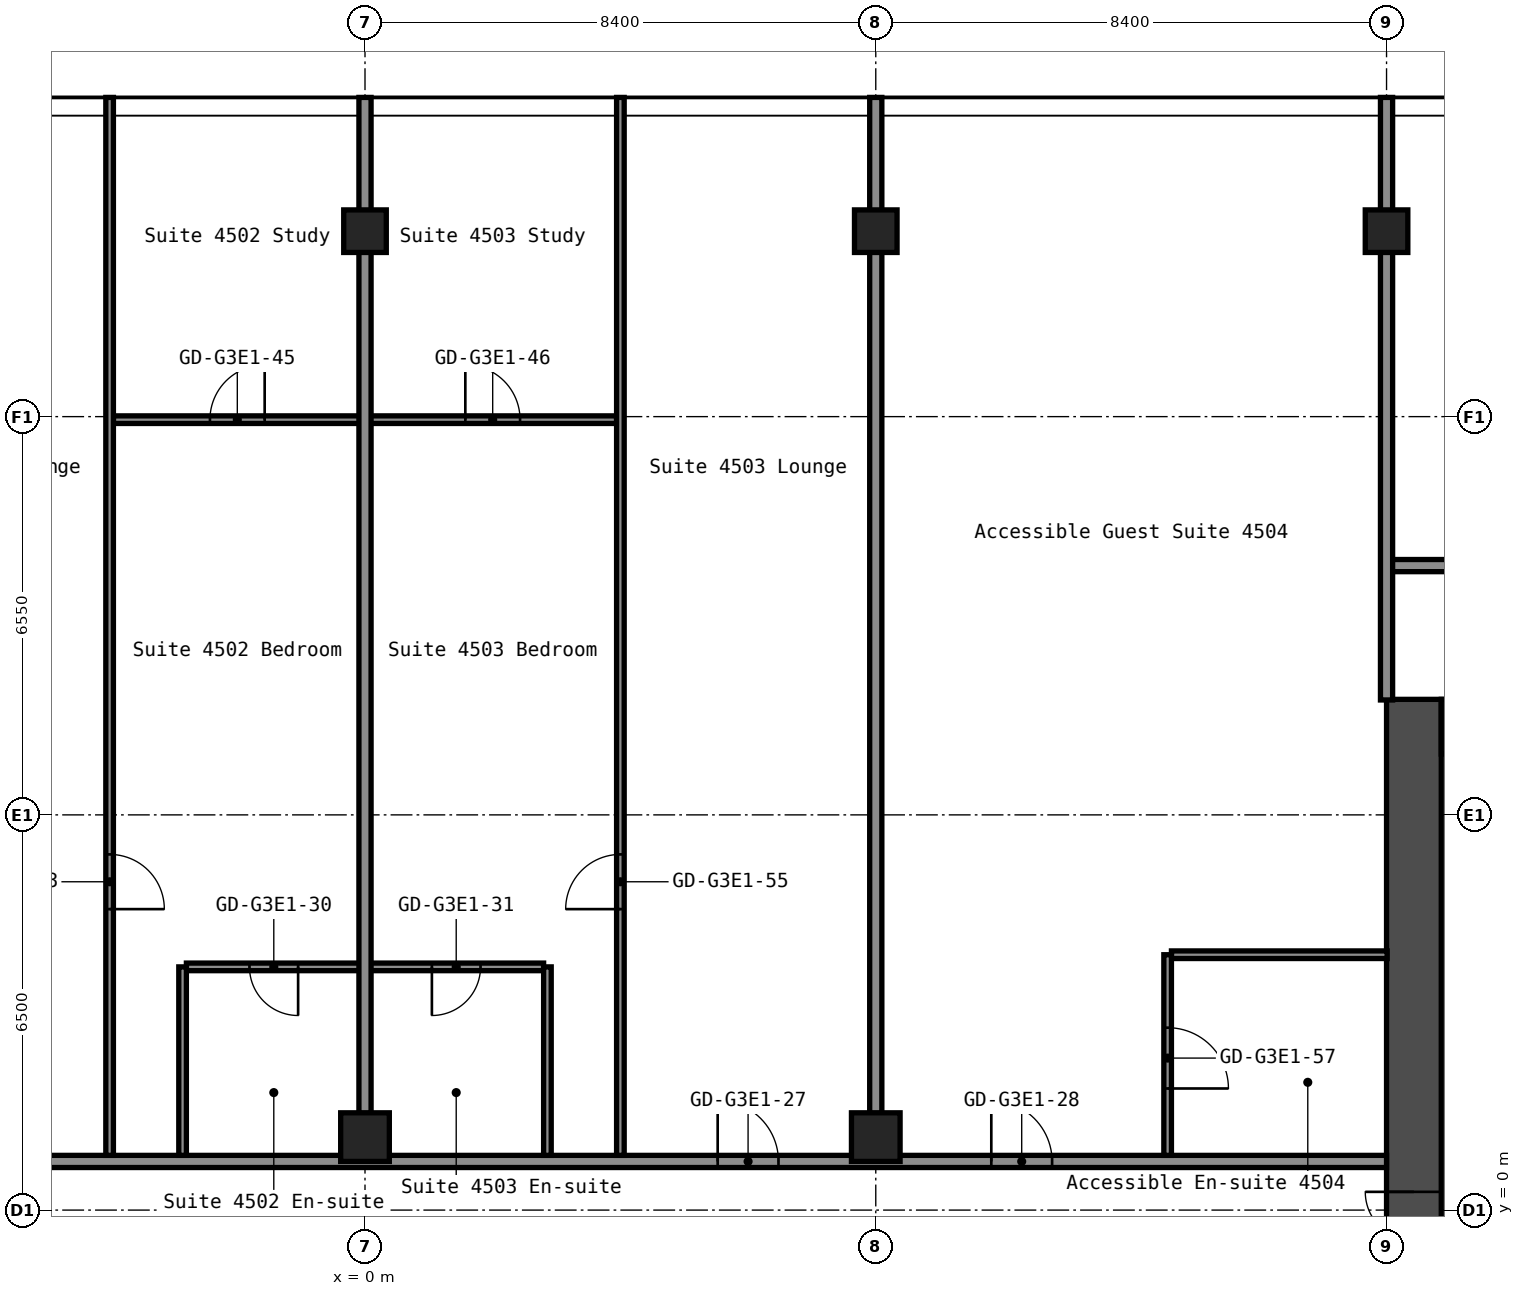
"""IFC4 building model, lengths in metres.
Left out: names, types, materials, properties, quantities, classifications, styles, units other than length and angle.
Written with IfcOpenShell. Run it as: python <this file> out.ifc"""

import sys

from ifc_helpers import new_model, si_unit, direction, frame, frame_2d, origin, origin_2d, place, context, subcontext, project, spatial, rectangle, hollow_rectangle, extrude, element, fill, save


model = new_model("IFC4")
c1 = context("Model", 3, precision=1e-05, world=origin(), true_north=direction((0.0, 1.0)))
c2 = subcontext(c1, "Body", "Model", "MODEL_VIEW")
j1 = project(units=[si_unit("LENGTHUNIT", "METRE"), si_unit("PLANEANGLEUNIT", "RADIAN")], contexts=[c1])
p1 = place(None, origin())
s1 = spatial("IfcSite", under=j1, at=p1, CompositionType="ELEMENT")
p2 = place(p1, origin())
s2 = spatial("IfcBuilding", under=s1, at=p2, CompositionType="ELEMENT")
p3 = place(p2, frame((0.0, 0.0, 159.8)))
s3 = spatial("IfcBuildingStorey", under=s2, at=p3, CompositionType="ELEMENT", Elevation=159.8)
p4 = place(p3, frame((0.0, 1.2, 0.0), z_axis=(0.0, 0.0, 1.0), x_axis=(1.0, 0.0, 0.0)))
e1 = element("IfcColumn", 1, at=p4, inside=s3, PredefinedType="COLUMN", context=c2, shape_type="SweptSolid", body=[
    extrude(hollow_rectangle(XDim=0.8, YDim=0.8, WallThickness=0.032, at=origin_2d()), origin(), (0.0, 0.0, 1.0), 2.75),
])
p5 = place(p3, frame((0.0, 16.1, 0.0), z_axis=(0.0, 0.0, 1.0), x_axis=(1.0, 0.0, 0.0)))
e2 = element("IfcColumn", 2, at=p5, inside=s3, PredefinedType="COLUMN", context=c2, shape_type="SweptSolid", body=[
    extrude(hollow_rectangle(XDim=0.7, YDim=0.7, WallThickness=0.028, at=origin_2d()), origin(), (0.0, 0.0, 1.0), 2.75),
])
p6 = place(p3, frame((8.4, 1.2, 0.0), z_axis=(0.0, 0.0, 1.0), x_axis=(1.0, 0.0, 0.0)))
e3 = element("IfcColumn", 3, at=p6, inside=s3, PredefinedType="COLUMN", context=c2, shape_type="SweptSolid", body=[
    extrude(hollow_rectangle(XDim=0.8, YDim=0.8, WallThickness=0.032, at=origin_2d()), origin(), (0.0, 0.0, 1.0), 2.75),
])
for number, where, z_axis, x_axis in (
    (4, (8.4, 16.1, 0.0), (0.0, 0.0, 1.0), (1.0, 0.0, 0.0)),
    (5, (16.8, 16.1, 0.0), (0.0, 0.0, 1.0), (1.0, 0.0, 0.0)),
):
    element("IfcColumn", number, at=place(p3, frame(where, z_axis=z_axis, x_axis=x_axis)), inside=s3, PredefinedType="COLUMN", context=c2, shape_type="SweptSolid", body=[
        extrude(hollow_rectangle(XDim=0.7, YDim=0.7, WallThickness=0.028, at=origin_2d()), origin(), (0.0, 0.0, 1.0), 2.75),
    ])
p7 = place(p3, frame((17.25, -8.4, 0.0), z_axis=(0.0, 0.0, 1.0), x_axis=(0.0, 1.0, 0.0)))
e6 = element("IfcWall", 6, at=p7, inside=s3, PredefinedType="SHEAR", context=c2, shape_type="SweptSolid", body=[
    extrude(rectangle(XDim=16.8, YDim=0.9, at=frame_2d((8.4, 0.0))), origin(), (0.0, 0.0, 1.0), 2.75),
])
p8 = place(p7, frame((7.1, 0.0, 0.0)))
e7 = element("IfcOpeningElement", 7, at=p8, cuts=e6, PredefinedType="OPENING", context=c2, shape_type="SweptSolid", body=[
    extrude(rectangle(XDim=1.6, YDim=2.1, at=frame_2d((0.8, 1.05))), frame((0.0, 0.46, 0.0), z_axis=(0.0, -1.0, 0.0), x_axis=(1.0, 0.0, 0.0)), (0.0, 0.0, 1.0), 0.92),
])
p9 = place(p3, frame((17.7, 7.95, 0.0), z_axis=(0.0, 0.0, 1.0), x_axis=(1.0, 0.0, 0.0)))
e8 = element("IfcWall", 8, at=p9, inside=s3, PredefinedType="SHEAR", context=c2, shape_type="SweptSolid", body=[
    extrude(rectangle(XDim=15.0, YDim=0.9, at=frame_2d((7.5, 0.0))), origin(), (0.0, 0.0, 1.0), 2.75),
])
p10 = place(p9, frame((10.4, 0.0, 0.0)))
e9 = element("IfcOpeningElement", 9, at=p10, cuts=e8, PredefinedType="OPENING", context=c2, shape_type="SweptSolid", body=[
    extrude(rectangle(XDim=1.2, YDim=2.1, at=frame_2d((0.6, 1.05))), frame((0.0, 0.46, 0.0), z_axis=(0.0, -1.0, 0.0), x_axis=(1.0, 0.0, 0.0)), (0.0, 0.0, 1.0), 0.92),
])
p11 = place(p9, frame((13.35, 0.0, 0.0)))
e10 = element("IfcOpeningElement", 10, at=p11, cuts=e8, PredefinedType="OPENING", context=c2, shape_type="SweptSolid", body=[
    extrude(rectangle(XDim=0.9, YDim=2.1, at=frame_2d((0.45, 1.05))), frame((0.0, 0.46, 0.0), z_axis=(0.0, -1.0, 0.0), x_axis=(1.0, 0.0, 0.0)), (0.0, 0.0, 1.0), 0.92),
])
p12 = place(p3, frame((-16.8, 0.8, 0.0), z_axis=(0.0, 0.0, 1.0), x_axis=(1.0, 0.0, 0.0)))
e11 = element("IfcWall", 11, at=p12, inside=s3, PredefinedType="PARTITIONING", context=c2, shape_type="SweptSolid", body=[
    extrude(rectangle(XDim=33.6, YDim=0.2, at=frame_2d((16.8, 0.0))), origin(), (0.0, 0.0, 1.0), 2.75),
])
p13 = place(p12, frame((1.6, 0.0, 0.0)))
e12 = element("IfcOpeningElement", 12, at=p13, cuts=e11, PredefinedType="OPENING", context=c2, shape_type="SweptSolid", body=[
    extrude(rectangle(XDim=1.0, YDim=2.1, at=frame_2d((0.5, 1.05))), frame((0.0, 0.11, 0.0), z_axis=(0.0, -1.0, 0.0), x_axis=(1.0, 0.0, 0.0)), (0.0, 0.0, 1.0), 0.22),
])
p14 = place(p12, frame((10.0, 0.0, 0.0)))
e13 = element("IfcOpeningElement", 13, at=p14, cuts=e11, PredefinedType="OPENING", context=c2, shape_type="SweptSolid", body=[
    extrude(rectangle(XDim=1.0, YDim=2.1, at=frame_2d((0.5, 1.05))), frame((0.0, 0.11, 0.0), z_axis=(0.0, -1.0, 0.0), x_axis=(1.0, 0.0, 0.0)), (0.0, 0.0, 1.0), 0.22),
])
p15 = place(p12, frame((22.6, 0.0, 0.0)))
e14 = element("IfcOpeningElement", 14, at=p15, cuts=e11, PredefinedType="OPENING", context=c2, shape_type="SweptSolid", body=[
    extrude(rectangle(XDim=1.0, YDim=2.1, at=frame_2d((0.5, 1.05))), frame((0.0, 0.11, 0.0), z_axis=(0.0, -1.0, 0.0), x_axis=(1.0, 0.0, 0.0)), (0.0, 0.0, 1.0), 0.22),
])
p16 = place(p12, frame((27.1, 0.0, 0.0)))
e15 = element("IfcOpeningElement", 15, at=p16, cuts=e11, PredefinedType="OPENING", context=c2, shape_type="SweptSolid", body=[
    extrude(rectangle(XDim=1.0, YDim=2.1, at=frame_2d((0.5, 1.05))), frame((0.0, 0.11, 0.0), z_axis=(0.0, -1.0, 0.0), x_axis=(1.0, 0.0, 0.0)), (0.0, 0.0, 1.0), 0.22),
])
p17 = place(p3, frame((-2.938, 4.0, 0.0), z_axis=(0.0, 0.0, 1.0), x_axis=(1.0, 0.0, 0.0)))
e16 = element("IfcWall", 16, at=p17, inside=s3, PredefinedType="PARTITIONING", context=c2, shape_type="SweptSolid", body=[
    extrude(rectangle(XDim=5.875, YDim=0.125, at=frame_2d((2.938, 0.0))), origin(), (0.0, 0.0, 1.0), 2.75),
])
p18 = place(p17, frame((1.038, 0.0, 0.0)))
e17 = element("IfcOpeningElement", 17, at=p18, cuts=e16, PredefinedType="OPENING", context=c2, shape_type="SweptSolid", body=[
    extrude(rectangle(XDim=0.8, YDim=2.1, at=frame_2d((0.4, 1.05))), frame((0.0, 0.073, 0.0), z_axis=(0.0, -1.0, 0.0), x_axis=(1.0, 0.0, 0.0)), (0.0, 0.0, 1.0), 0.145),
])
p19 = place(p17, frame((4.038, 0.0, 0.0)))
e18 = element("IfcOpeningElement", 18, at=p19, cuts=e16, PredefinedType="OPENING", context=c2, shape_type="SweptSolid", body=[
    extrude(rectangle(XDim=0.8, YDim=2.1, at=frame_2d((0.4, 1.05))), frame((0.0, 0.073, 0.0), z_axis=(0.0, -1.0, 0.0), x_axis=(1.0, 0.0, 0.0)), (0.0, 0.0, 1.0), 0.145),
])
p20 = place(p3, frame((13.262, 4.2, 0.0), z_axis=(0.0, 0.0, 1.0), x_axis=(1.0, 0.0, 0.0)))
e19 = element("IfcWall", 19, at=p20, inside=s3, PredefinedType="PARTITIONING", context=c2, shape_type="SweptSolid", body=[
    extrude(rectangle(XDim=3.548, YDim=0.125, at=frame_2d((1.774, 0.0))), origin(), (0.0, 0.0, 1.0), 2.75),
])
p21 = place(p3, frame((16.8, 10.6, 0.0), z_axis=(0.0, 0.0, 1.0), x_axis=(1.0, 0.0, 0.0)))
e20 = element("IfcWall", 20, at=p21, inside=s3, PredefinedType="PARTITIONING", context=c2, shape_type="SweptSolid", body=[
    extrude(rectangle(XDim=25.9, YDim=0.2, at=frame_2d((12.95, 0.0))), origin(), (0.0, 0.0, 1.0), 2.75),
])
p22 = place(p21, frame((2.0, 0.0, 0.0)))
e21 = element("IfcOpeningElement", 21, at=p22, cuts=e20, PredefinedType="OPENING", context=c2, shape_type="SweptSolid", body=[
    extrude(rectangle(XDim=1.0, YDim=2.1, at=frame_2d((0.5, 1.05))), frame((0.0, 0.11, 0.0), z_axis=(0.0, -1.0, 0.0), x_axis=(1.0, 0.0, 0.0)), (0.0, 0.0, 1.0), 0.22),
])
p23 = place(p21, frame((10.4, 0.0, 0.0)))
e22 = element("IfcOpeningElement", 22, at=p23, cuts=e20, PredefinedType="OPENING", context=c2, shape_type="SweptSolid", body=[
    extrude(rectangle(XDim=1.0, YDim=2.1, at=frame_2d((0.5, 1.05))), frame((0.0, 0.11, 0.0), z_axis=(0.0, -1.0, 0.0), x_axis=(1.0, 0.0, 0.0)), (0.0, 0.0, 1.0), 0.22),
])
p24 = place(p21, frame((22.4, 0.0, 0.0)))
e23 = element("IfcOpeningElement", 23, at=p24, cuts=e20, PredefinedType="OPENING", context=c2, shape_type="SweptSolid", body=[
    extrude(rectangle(XDim=1.0, YDim=2.1, at=frame_2d((0.5, 1.05))), frame((0.0, 0.11, 0.0), z_axis=(0.0, -1.0, 0.0), x_axis=(1.0, 0.0, 0.0)), (0.0, 0.0, 1.0), 0.22),
])
p25 = place(p3, frame((-4.137, 13.0, 0.0), z_axis=(0.0, 0.0, 1.0), x_axis=(1.0, 0.0, 0.0)))
e24 = element("IfcWall", 24, at=p25, inside=s3, PredefinedType="PARTITIONING", context=c2, shape_type="SweptSolid", body=[
    extrude(rectangle(XDim=8.275, YDim=0.125, at=frame_2d((4.137, 0.0))), origin(), (0.0, 0.0, 1.0), 2.75),
])
p26 = place(p25, frame((1.587, 0.0, 0.0)))
e25 = element("IfcOpeningElement", 25, at=p26, cuts=e24, PredefinedType="OPENING", context=c2, shape_type="SweptSolid", body=[
    extrude(rectangle(XDim=0.9, YDim=2.1, at=frame_2d((0.45, 1.05))), frame((0.0, 0.073, 0.0), z_axis=(0.0, -1.0, 0.0), x_axis=(1.0, 0.0, 0.0)), (0.0, 0.0, 1.0), 0.145),
])
p27 = place(p25, frame((5.788, 0.0, 0.0)))
e26 = element("IfcOpeningElement", 26, at=p27, cuts=e24, PredefinedType="OPENING", context=c2, shape_type="SweptSolid", body=[
    extrude(rectangle(XDim=0.9, YDim=2.1, at=frame_2d((0.45, 1.05))), frame((0.0, 0.073, 0.0), z_axis=(0.0, -1.0, 0.0), x_axis=(1.0, 0.0, 0.0)), (0.0, 0.0, 1.0), 0.145),
])
p28 = place(p3, frame((-4.2, 0.9, 0.0), z_axis=(0.0, 0.0, 1.0), x_axis=(0.0, 1.0, 0.0)))
e27 = element("IfcWall", 27, at=p28, inside=s3, PredefinedType="PARTITIONING", context=c2, shape_type="SweptSolid", body=[
    extrude(rectangle(XDim=17.4, YDim=0.125, at=frame_2d((8.7, 0.0))), origin(), (0.0, 0.0, 1.0), 2.75),
])
p29 = place(p28, frame((4.05, 0.0, 0.0)))
e28 = element("IfcOpeningElement", 28, at=p29, cuts=e27, PredefinedType="OPENING", context=c2, shape_type="SweptSolid", body=[
    extrude(rectangle(XDim=0.9, YDim=2.1, at=frame_2d((0.45, 1.05))), frame((0.0, 0.073, 0.0), z_axis=(0.0, -1.0, 0.0), x_axis=(1.0, 0.0, 0.0)), (0.0, 0.0, 1.0), 0.145),
])
p30 = place(p3, frame((-3.0, 0.9, 0.0), z_axis=(0.0, 0.0, 1.0), x_axis=(0.0, 1.0, 0.0)))
e29 = element("IfcWall", 29, at=p30, inside=s3, PredefinedType="PARTITIONING", context=c2, shape_type="SweptSolid", body=[
    extrude(rectangle(XDim=3.1, YDim=0.125, at=frame_2d((1.55, 0.0))), origin(), (0.0, 0.0, 1.0), 2.75),
])
p31 = place(p3, frame((0.0, 1.59, 0.0), z_axis=(0.0, 0.0, 1.0), x_axis=(0.0, 1.0, 0.0)))
e30 = element("IfcWall", 30, at=p31, inside=s3, PredefinedType="PARTITIONING", context=c2, shape_type="SweptSolid", body=[
    extrude(rectangle(XDim=16.71, YDim=0.2, at=frame_2d((8.355, 0.0))), origin(), (0.0, 0.0, 1.0), 2.75),
])
p32 = place(p3, frame((3.0, 0.9, 0.0), z_axis=(0.0, 0.0, 1.0), x_axis=(0.0, 1.0, 0.0)))
e31 = element("IfcWall", 31, at=p32, inside=s3, PredefinedType="PARTITIONING", context=c2, shape_type="SweptSolid", body=[
    extrude(rectangle(XDim=3.1, YDim=0.125, at=frame_2d((1.55, 0.0))), origin(), (0.0, 0.0, 1.0), 2.75),
])
p33 = place(p3, frame((4.2, 0.9, 0.0), z_axis=(0.0, 0.0, 1.0), x_axis=(0.0, 1.0, 0.0)))
e32 = element("IfcWall", 32, at=p33, inside=s3, PredefinedType="PARTITIONING", context=c2, shape_type="SweptSolid", body=[
    extrude(rectangle(XDim=17.4, YDim=0.125, at=frame_2d((8.7, 0.0))), origin(), (0.0, 0.0, 1.0), 2.75),
])
p34 = place(p33, frame((4.05, 0.0, 0.0)))
e33 = element("IfcOpeningElement", 33, at=p34, cuts=e32, PredefinedType="OPENING", context=c2, shape_type="SweptSolid", body=[
    extrude(rectangle(XDim=0.9, YDim=2.1, at=frame_2d((0.45, 1.05))), frame((0.0, 0.073, 0.0), z_axis=(0.0, -1.0, 0.0), x_axis=(1.0, 0.0, 0.0)), (0.0, 0.0, 1.0), 0.145),
])
p35 = place(p3, frame((8.4, 1.59, 0.0), z_axis=(0.0, 0.0, 1.0), x_axis=(0.0, 1.0, 0.0)))
e34 = element("IfcWall", 34, at=p35, inside=s3, PredefinedType="PARTITIONING", context=c2, shape_type="SweptSolid", body=[
    extrude(rectangle(XDim=16.71, YDim=0.2, at=frame_2d((8.355, 0.0))), origin(), (0.0, 0.0, 1.0), 2.75),
])
p36 = place(p3, frame((13.2, 0.9, 0.0), z_axis=(0.0, 0.0, 1.0), x_axis=(0.0, 1.0, 0.0)))
e35 = element("IfcWall", 35, at=p36, inside=s3, PredefinedType="PARTITIONING", context=c2, shape_type="SweptSolid", body=[
    extrude(rectangle(XDim=3.3, YDim=0.125, at=frame_2d((1.65, 0.0))), origin(), (0.0, 0.0, 1.0), 2.75),
])
p37 = place(p36, frame((1.1, 0.0, 0.0)))
e36 = element("IfcOpeningElement", 36, at=p37, cuts=e35, PredefinedType="OPENING", context=c2, shape_type="SweptSolid", body=[
    extrude(rectangle(XDim=1.0, YDim=2.1, at=frame_2d((0.5, 1.05))), frame((0.0, 0.073, 0.0), z_axis=(0.0, -1.0, 0.0), x_axis=(1.0, 0.0, 0.0)), (0.0, 0.0, 1.0), 0.145),
])
p38 = place(p3, frame((16.8, 8.39, 0.0), z_axis=(0.0, 0.0, 1.0), x_axis=(0.0, 1.0, 0.0)))
e37 = element("IfcWall", 37, at=p38, inside=s3, PredefinedType="PARTITIONING", context=c2, shape_type="SweptSolid", body=[
    extrude(rectangle(XDim=9.91, YDim=0.2, at=frame_2d((4.955, 0.0))), origin(), (0.0, 0.0, 1.0), 2.75),
])
p39 = place(p8, origin())
e38 = element("IfcDoor", 38, at=p39, inside=s3, OperationType="DOUBLE_DOOR_SINGLE_SWING", PredefinedType="DOOR", context=c2, shape_type="SweptSolid", body=[
    extrude(rectangle(XDim=1.6, YDim=2.1, at=frame_2d((0.8, 1.05))), frame((0.0, 0.025, 0.0), z_axis=(0.0, -1.0, 0.0), x_axis=(1.0, 0.0, 0.0)), (0.0, 0.0, 1.0), 0.05),
])
fill(e7, e38)
p40 = place(p15, origin())
e39 = element("IfcDoor", 39, at=p40, inside=s3, OperationType="SINGLE_SWING_RIGHT", PredefinedType="DOOR", context=c2, shape_type="SweptSolid", body=[
    extrude(rectangle(XDim=1.0, YDim=2.1, at=frame_2d((0.5, 1.05))), frame((0.0, 0.025, 0.0), z_axis=(0.0, -1.0, 0.0), x_axis=(1.0, 0.0, 0.0)), (0.0, 0.0, 1.0), 0.05),
])
fill(e14, e39)
p41 = place(p16, origin())
e40 = element("IfcDoor", 40, at=p41, inside=s3, OperationType="SINGLE_SWING_RIGHT", PredefinedType="DOOR", context=c2, shape_type="SweptSolid", body=[
    extrude(rectangle(XDim=1.0, YDim=2.1, at=frame_2d((0.5, 1.05))), frame((0.0, 0.025, 0.0), z_axis=(0.0, -1.0, 0.0), x_axis=(1.0, 0.0, 0.0)), (0.0, 0.0, 1.0), 0.05),
])
fill(e15, e40)
p42 = place(p18, origin())
e41 = element("IfcDoor", 41, at=p42, inside=s3, OperationType="SINGLE_SWING_RIGHT", PredefinedType="DOOR", context=c2, shape_type="SweptSolid", body=[
    extrude(rectangle(XDim=0.8, YDim=2.1, at=frame_2d((0.4, 1.05))), frame((0.0, 0.025, 0.0), z_axis=(0.0, -1.0, 0.0), x_axis=(1.0, 0.0, 0.0)), (0.0, 0.0, 1.0), 0.05),
])
fill(e17, e41)
p43 = place(p19, origin())
e42 = element("IfcDoor", 42, at=p43, inside=s3, OperationType="SINGLE_SWING_LEFT", PredefinedType="DOOR", context=c2, shape_type="SweptSolid", body=[
    extrude(rectangle(XDim=0.8, YDim=2.1, at=frame_2d((0.4, 1.05))), frame((0.0, 0.025, 0.0), z_axis=(0.0, -1.0, 0.0), x_axis=(1.0, 0.0, 0.0)), (0.0, 0.0, 1.0), 0.05),
])
fill(e18, e42)
p44 = place(p26, origin())
e43 = element("IfcDoor", 43, at=p44, inside=s3, OperationType="SINGLE_SWING_LEFT", PredefinedType="DOOR", context=c2, shape_type="SweptSolid", body=[
    extrude(rectangle(XDim=0.9, YDim=2.1, at=frame_2d((0.45, 1.05))), frame((0.0, 0.025, 0.0), z_axis=(0.0, -1.0, 0.0), x_axis=(1.0, 0.0, 0.0)), (0.0, 0.0, 1.0), 0.05),
])
fill(e25, e43)
p45 = place(p27, origin())
e44 = element("IfcDoor", 44, at=p45, inside=s3, OperationType="SINGLE_SWING_RIGHT", PredefinedType="DOOR", context=c2, shape_type="SweptSolid", body=[
    extrude(rectangle(XDim=0.9, YDim=2.1, at=frame_2d((0.45, 1.05))), frame((0.0, 0.025, 0.0), z_axis=(0.0, -1.0, 0.0), x_axis=(1.0, 0.0, 0.0)), (0.0, 0.0, 1.0), 0.05),
])
fill(e26, e44)
p46 = place(p29, origin())
e45 = element("IfcDoor", 45, at=p46, inside=s3, OperationType="SINGLE_SWING_LEFT", PredefinedType="DOOR", context=c2, shape_type="SweptSolid", body=[
    extrude(rectangle(XDim=0.9, YDim=2.1, at=frame_2d((0.45, 1.05))), frame((0.0, 0.025, 0.0), z_axis=(0.0, -1.0, 0.0), x_axis=(1.0, 0.0, 0.0)), (0.0, 0.0, 1.0), 0.05),
])
fill(e28, e45)
p47 = place(p34, origin())
e46 = element("IfcDoor", 46, at=p47, inside=s3, OperationType="SINGLE_SWING_RIGHT", PredefinedType="DOOR", context=c2, shape_type="SweptSolid", body=[
    extrude(rectangle(XDim=0.9, YDim=2.1, at=frame_2d((0.45, 1.05))), frame((0.0, 0.025, 0.0), z_axis=(0.0, -1.0, 0.0), x_axis=(1.0, 0.0, 0.0)), (0.0, 0.0, 1.0), 0.05),
])
fill(e33, e46)
p48 = place(p37, origin())
e47 = element("IfcDoor", 47, at=p48, inside=s3, OperationType="SINGLE_SWING_LEFT", PredefinedType="DOOR", context=c2, shape_type="SweptSolid", body=[
    extrude(rectangle(XDim=1.0, YDim=2.1, at=frame_2d((0.5, 1.05))), frame((0.0, 0.025, 0.0), z_axis=(0.0, -1.0, 0.0), x_axis=(1.0, 0.0, 0.0)), (0.0, 0.0, 1.0), 0.05),
])
fill(e36, e47)
save(model, sys.argv[1])
